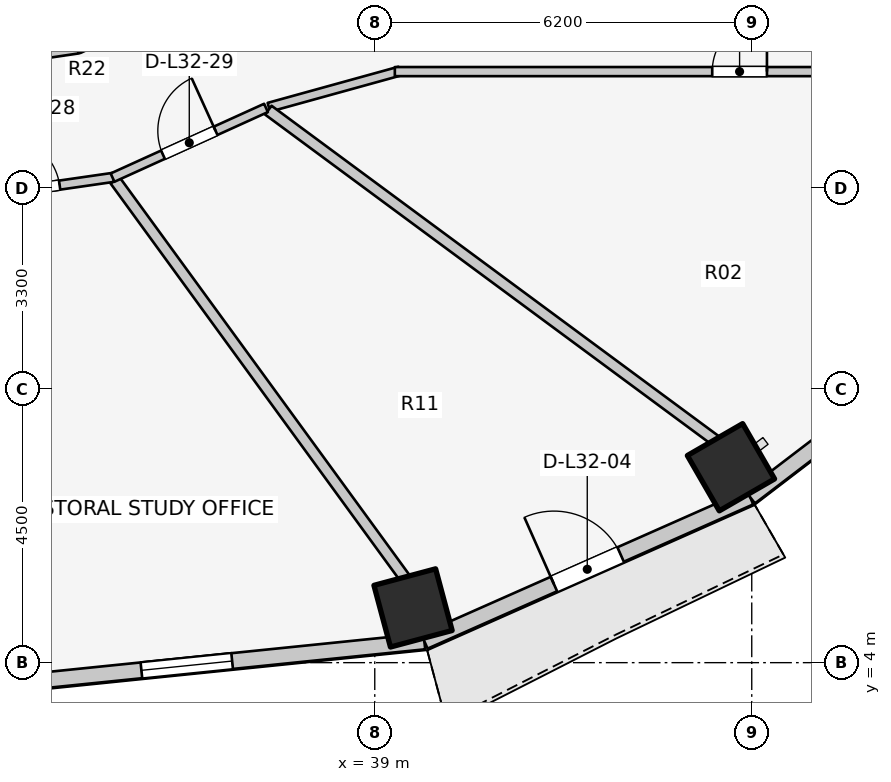
"""IFC4 building model, lengths in metres.
Left out: names, types, materials, properties, quantities, classifications, styles, units other than length and angle.
Written with IfcOpenShell. Run it as: python <this file> out.ifc"""

import sys

from ifc_helpers import new_model, si_unit, direction, frame, frame_2d, origin, origin_2d, place, context, subcontext, project, spatial, rectangle, extrude, element, fill, save


model = new_model("IFC4")
c1 = context("Model", 3, precision=1e-05, world=origin(), true_north=direction((0.0, 1.0)))
c2 = subcontext(c1, "Body", "Model", "MODEL_VIEW")
j1 = project(units=[si_unit("LENGTHUNIT", "METRE"), si_unit("PLANEANGLEUNIT", "RADIAN")], contexts=[c1])
p1 = place(None, origin())
s1 = spatial("IfcSite", under=j1, at=p1, CompositionType="ELEMENT")
p2 = place(p1, origin())
s2 = spatial("IfcBuilding", under=s1, at=p2, CompositionType="ELEMENT")
p3 = place(p2, frame((0.0, 0.0, 107.3)))
s3 = spatial("IfcBuildingStorey", under=s2, at=p3, CompositionType="ELEMENT", Elevation=107.3)
for number, where, z_axis, x_axis in (
    (1, (39.629, 4.9, 0.0), (0.0, 0.0, 1.0), (0.259, -0.966, 0.0)),
    (2, (44.858, 7.214, 0.0), (0.0, 0.0, 1.0), (0.5, -0.866, 0.0)),
):
    element("IfcColumn", number, at=place(p3, frame(where, z_axis=z_axis, x_axis=x_axis)), inside=s3, PredefinedType="COLUMN", context=c2, shape_type="SweptSolid", body=[
        extrude(rectangle(XDim=1.05, YDim=1.05, at=origin_2d()), origin(), (0.0, 0.0, 1.0), 3.1),
    ])
p4 = place(p3, frame((32.0, 3.551, 0.0), z_axis=(0.0, 0.0, 1.0), x_axis=(0.994821390558, 0.101638579726, 0.0)))
e3 = element("IfcWall", 3, at=p4, inside=s3, PredefinedType="STANDARD", context=c2, shape_type="SweptSolid", body=[
    extrude(rectangle(XDim=7.857, YDim=0.26, at=frame_2d((3.929, 0.0))), origin(), (0.0, 0.0, 1.0), 2.85),
])
p5 = place(p4, frame((3.178, 0.0, 0.75)))
e4 = element("IfcOpeningElement", 4, at=p5, cuts=e3, PredefinedType="OPENING", context=c2, shape_type="SweptSolid", body=[
    extrude(rectangle(XDim=1.5, YDim=1.6, at=frame_2d((0.75, 0.8))), frame((0.0, 0.14, 0.0), z_axis=(0.0, -1.0, 0.0), x_axis=(1.0, 0.0, 0.0)), (0.0, 0.0, 1.0), 0.28),
])
p6 = place(p3, frame((39.816, 4.349, 0.0), z_axis=(0.0, 0.0, 1.0), x_axis=(0.914336605747, 0.404955023911, 0.0)))
e5 = element("IfcWall", 5, at=p6, inside=s3, PredefinedType="STANDARD", context=c2, shape_type="SweptSolid", body=[
    extrude(rectangle(XDim=5.859, YDim=0.26, at=frame_2d((2.929, 0.0))), origin(), (0.0, 0.0, 1.0), 2.88),
])
p7 = place(p6, frame((2.329, 0.0, 0.0)))
e6 = element("IfcOpeningElement", 6, at=p7, cuts=e5, PredefinedType="OPENING", context=c2, shape_type="SweptSolid", body=[
    extrude(rectangle(XDim=1.2, YDim=2.2, at=frame_2d((0.6, 1.1))), frame((0.0, 0.14, 0.0), z_axis=(0.0, -1.0, 0.0), x_axis=(1.0, 0.0, 0.0)), (0.0, 0.0, 1.0), 0.28),
])
p8 = place(p3, frame((45.173, 6.722, 0.0), z_axis=(0.0, 0.0, 1.0), x_axis=(0.794809810864, 0.606858603427, 0.0)))
e7 = element("IfcWall", 7, at=p8, inside=s3, PredefinedType="STANDARD", context=c2, shape_type="SweptSolid", body=[
    extrude(rectangle(XDim=5.149, YDim=0.26, at=frame_2d((2.575, 0.0))), origin(), (0.0, 0.0, 1.0), 2.85),
])
p9 = place(p3, frame((32.0, 13.78, 0.0), z_axis=(0.0, 0.0, 1.0), x_axis=(0.989268584896, 0.146108408166, 0.0)))
e8 = element("IfcWall", 8, at=p9, inside=s3, PredefinedType="PARTITIONING", context=c2, shape_type="SweptSolid", body=[
    extrude(rectangle(XDim=2.151, YDim=0.15, at=frame_2d((1.075, 0.0))), origin(), (0.0, 0.0, 1.0), 2.272),
])
p10 = place(p3, frame((34.127, 14.094, 0.0), z_axis=(0.0, 0.0, 1.0), x_axis=(0.906943449489, 0.421252393975, 0.0)))
e9 = element("IfcWall", 9, at=p10, inside=s3, PredefinedType="PARTITIONING", context=c2, shape_type="SweptSolid", body=[
    extrude(rectangle(XDim=2.186, YDim=0.15, at=frame_2d((1.093, 0.0))), origin(), (0.0, 0.0, 1.0), 2.272),
])
p11 = place(p3, frame((37.258, 13.133, 0.0), z_axis=(0.0, 0.0, 1.0), x_axis=(0.963833843713, 0.266503886865, 0.0)))
e10 = element("IfcWall", 10, at=p11, inside=s3, PredefinedType="PARTITIONING", context=c2, shape_type="SweptSolid", body=[
    extrude(rectangle(XDim=2.232, YDim=0.15, at=frame_2d((1.116, 0.0))), origin(), (0.0, 0.0, 1.0), 2.272),
])
p12 = place(p3, frame((39.33, 13.72, 0.0), z_axis=(0.0, 0.0, 1.0), x_axis=(1.0, 0.0, 0.0)))
e11 = element("IfcWall", 11, at=p12, inside=s3, PredefinedType="PARTITIONING", context=c2, shape_type="SweptSolid", body=[
    extrude(rectangle(XDim=7.52, YDim=0.15, at=frame_2d((3.76, 0.0))), origin(), (0.0, 0.0, 1.0), 2.272),
])
p13 = place(p12, frame((5.22, 0.0, 0.0)))
e12 = element("IfcOpeningElement", 12, at=p13, cuts=e11, PredefinedType="OPENING", context=c2, shape_type="SweptSolid", body=[
    extrude(rectangle(XDim=0.9, YDim=2.1, at=frame_2d((0.45, 1.05))), frame((0.0, 0.085, 0.0), z_axis=(0.0, -1.0, 0.0), x_axis=(1.0, 0.0, 0.0)), (0.0, 0.0, 1.0), 0.17),
])
p14 = place(p3, frame((34.727, 11.934, 0.0), z_axis=(0.0, 0.0, 1.0), x_axis=(0.589042211476, -0.808102266486, 0.0)))
e13 = element("IfcWall", 13, at=p14, inside=s3, PredefinedType="PARTITIONING", context=c2, shape_type="SweptSolid", body=[
    extrude(rectangle(XDim=8.101, YDim=0.18, at=frame_2d((4.051, 0.0))), origin(), (0.0, 0.0, 1.0), 2.272),
])
p15 = place(p3, frame((37.249, 13.086, 0.0), z_axis=(0.0, 0.0, 1.0), x_axis=(0.80430981394, -0.594210167533, 0.0)))
e14 = element("IfcWall", 14, at=p15, inside=s3, PredefinedType="PARTITIONING", context=c2, shape_type="SweptSolid", body=[
    extrude(rectangle(XDim=9.146, YDim=0.18, at=frame_2d((4.573, 0.0))), origin(), (0.0, 0.0, 1.0), 2.272),
])
p16 = place(p3, frame((31.993, 11.59, 0.0), z_axis=(0.0, 0.0, 1.0), x_axis=(0.989748682384, 0.142819976611, 0.0)))
e15 = element("IfcWall", 15, at=p16, inside=s3, PredefinedType="PARTITIONING", context=c2, shape_type="SweptSolid", body=[
    extrude(rectangle(XDim=2.737, YDim=0.15, at=frame_2d((1.368, 0.0))), origin(), (0.0, 0.0, 1.0), 2.272),
])
p17 = place(p16, frame((0.893, 0.0, 0.0)))
e16 = element("IfcOpeningElement", 16, at=p17, cuts=e15, PredefinedType="OPENING", context=c2, shape_type="SweptSolid", body=[
    extrude(rectangle(XDim=0.95, YDim=2.1, at=frame_2d((0.475, 1.05))), frame((0.0, 0.085, 0.0), z_axis=(0.0, -1.0, 0.0), x_axis=(1.0, 0.0, 0.0)), (0.0, 0.0, 1.0), 0.17),
])
p18 = place(p3, frame((34.687, 11.977, 0.0), z_axis=(0.0, 0.0, 1.0), x_axis=(0.910568469686, 0.41335827319, 0.0)))
e17 = element("IfcWall", 17, at=p18, inside=s3, PredefinedType="PARTITIONING", context=c2, shape_type="SweptSolid", body=[
    extrude(rectangle(XDim=2.772, YDim=0.15, at=frame_2d((1.386, 0.0))), origin(), (0.0, 0.0, 1.0), 2.272),
])
p19 = place(p18, frame((0.911, 0.0, 0.0)))
e18 = element("IfcOpeningElement", 18, at=p19, cuts=e17, PredefinedType="OPENING", context=c2, shape_type="SweptSolid", body=[
    extrude(rectangle(XDim=0.95, YDim=2.1, at=frame_2d((0.475, 1.05))), frame((0.0, 0.085, 0.0), z_axis=(0.0, -1.0, 0.0), x_axis=(1.0, 0.0, 0.0)), (0.0, 0.0, 1.0), 0.17),
])
p20 = place(p5, origin())
e19 = element("IfcWindow", 19, at=p20, inside=s3, PartitioningType="SINGLE_PANEL", PredefinedType="WINDOW", context=c2, shape_type="SweptSolid", body=[
    extrude(rectangle(XDim=1.5, YDim=1.6, at=frame_2d((0.75, 0.8))), frame((0.0, 0.03, 0.0), z_axis=(0.0, -1.0, 0.0), x_axis=(1.0, 0.0, 0.0)), (0.0, 0.0, 1.0), 0.06),
])
fill(e4, e19)
p21 = place(p7, origin())
e20 = element("IfcDoor", 20, at=p21, inside=s3, OperationType="SINGLE_SWING_LEFT", PredefinedType="DOOR", context=c2, shape_type="SweptSolid", body=[
    extrude(rectangle(XDim=1.2, YDim=2.2, at=frame_2d((0.6, 1.1))), frame((0.0, 0.025, 0.0), z_axis=(0.0, -1.0, 0.0), x_axis=(1.0, 0.0, 0.0)), (0.0, 0.0, 1.0), 0.05),
])
fill(e6, e20)
p22 = place(p13, origin())
e21 = element("IfcDoor", 21, at=p22, inside=s3, OperationType="SINGLE_SWING_RIGHT", PredefinedType="DOOR", context=c2, shape_type="SweptSolid", body=[
    extrude(rectangle(XDim=0.9, YDim=2.1, at=frame_2d((0.45, 1.05))), frame((0.0, 0.025, 0.0), z_axis=(0.0, -1.0, 0.0), x_axis=(1.0, 0.0, 0.0)), (0.0, 0.0, 1.0), 0.05),
])
fill(e12, e21)
p23 = place(p17, origin())
e22 = element("IfcDoor", 22, at=p23, inside=s3, OperationType="SINGLE_SWING_LEFT", PredefinedType="DOOR", context=c2, shape_type="SweptSolid", body=[
    extrude(rectangle(XDim=0.95, YDim=2.1, at=frame_2d((0.475, 1.05))), frame((0.0, 0.025, 0.0), z_axis=(0.0, -1.0, 0.0), x_axis=(1.0, 0.0, 0.0)), (0.0, 0.0, 1.0), 0.05),
])
fill(e16, e22)
p24 = place(p19, origin())
e23 = element("IfcDoor", 23, at=p24, inside=s3, OperationType="SINGLE_SWING_RIGHT", PredefinedType="DOOR", context=c2, shape_type="SweptSolid", body=[
    extrude(rectangle(XDim=0.95, YDim=2.1, at=frame_2d((0.475, 1.05))), frame((0.0, 0.025, 0.0), z_axis=(0.0, -1.0, 0.0), x_axis=(1.0, 0.0, 0.0)), (0.0, 0.0, 1.0), 0.05),
])
fill(e18, e23)
save(model, sys.argv[1])
